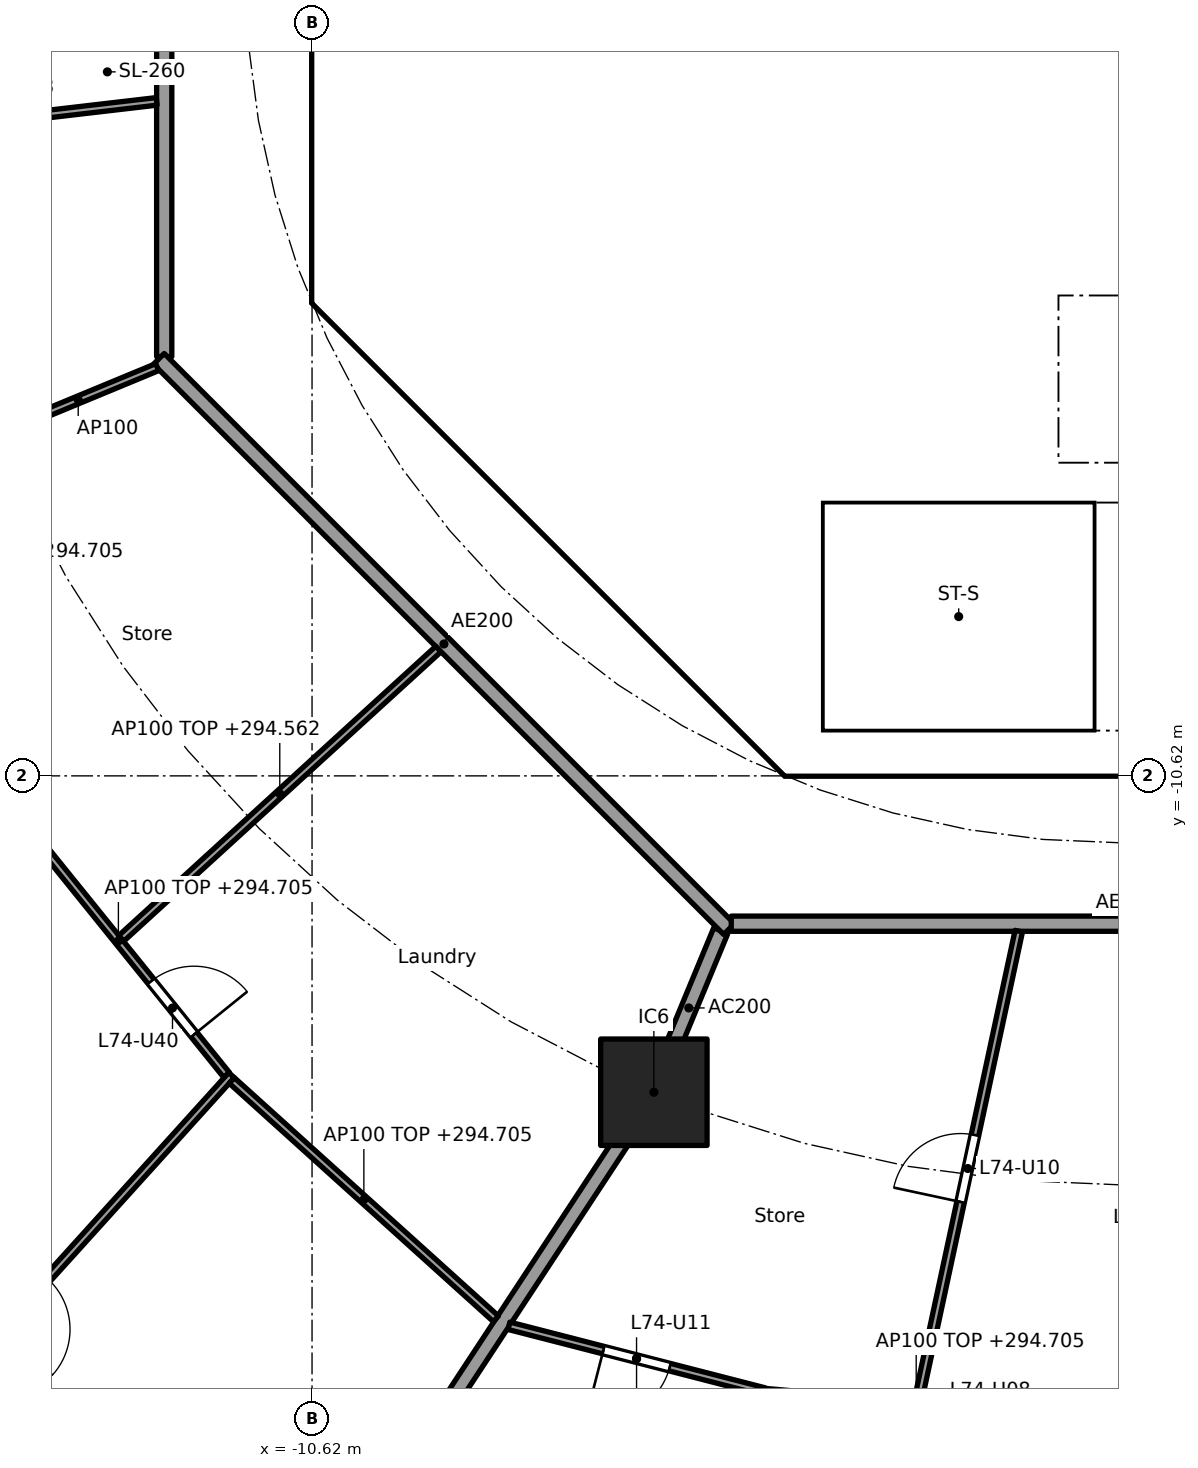
"""IFC4 building model, lengths in metres.
Left out: names, types, materials, properties, quantities, classifications, styles, units other than length and angle.
Written with IfcOpenShell. Run it as: python <this file> out.ifc"""

import sys

from ifc_helpers import new_model, si_unit, direction, frame, frame_2d, origin, origin_2d, place, context, subcontext, project, spatial, polyline, rectangle, outline, extrude, element, fill, save


model = new_model("IFC4")
c1 = context("Model", 3, precision=1e-05, world=origin(), true_north=direction((0.0, 1.0)))
c2 = subcontext(c1, "Body", "Model", "MODEL_VIEW")
j1 = project(units=[si_unit("LENGTHUNIT", "METRE"), si_unit("PLANEANGLEUNIT", "RADIAN")], contexts=[c1])
p1 = place(None, origin())
s1 = spatial("IfcSite", under=j1, at=p1, CompositionType="ELEMENT")
p2 = place(p1, origin())
s2 = spatial("IfcBuilding", under=s1, at=p2, CompositionType="ELEMENT")
p3 = place(p2, frame((0.0, 0.0, 291.8)))
s3 = spatial("IfcBuildingStorey", under=s2, at=p3, CompositionType="ELEMENT", Elevation=291.8)
p4 = place(p3, frame((-6.123, -14.782, 0.0), z_axis=(0.0, 0.0, 1.0), x_axis=(1.0, 0.0, 0.0)))
e1 = element("IfcColumn", 1, at=p4, inside=s3, PredefinedType="COLUMN", context=c2, shape_type="SweptSolid", body=[
    extrude(rectangle(XDim=1.4, YDim=1.4, at=origin_2d()), origin(), (0.0, 0.0, 1.0), 3.7),
])
p5 = place(p3, frame((-10.325, 3.801, 0.0), z_axis=(0.0, 0.0, 1.0), x_axis=(0.0, -1.0, 0.0)))
e2 = element("IfcWall", 2, at=p5, inside=s3, PredefinedType="SHEAR", context=c2, shape_type="SweptSolid", body=[
    extrude(rectangle(XDim=7.602, YDim=0.6, at=frame_2d((3.801, 0.0))), origin(), (0.0, 0.0, 1.0), 3.44),
])
p6 = place(p5, frame((0.651, 0.0, 0.0)))
e3 = element("IfcOpeningElement", 3, at=p6, cuts=e2, PredefinedType="OPENING", context=c2, shape_type="SweptSolid", body=[
    extrude(rectangle(XDim=1.5, YDim=2.1, at=frame_2d((0.75, 1.05))), frame((0.0, 0.31, 0.0), z_axis=(0.0, -1.0, 0.0), x_axis=(1.0, 0.0, 0.0)), (0.0, 0.0, 1.0), 0.62),
])
p7 = place(p5, frame((5.451, 0.0, 0.0)))
e4 = element("IfcOpeningElement", 4, at=p7, cuts=e2, PredefinedType="OPENING", context=c2, shape_type="SweptSolid", body=[
    extrude(rectangle(XDim=1.5, YDim=2.1, at=frame_2d((0.75, 1.05))), frame((0.0, 0.31, 0.0), z_axis=(0.0, -1.0, 0.0), x_axis=(1.0, 0.0, 0.0)), (0.0, 0.0, 1.0), 0.62),
])
p8 = place(p3, frame((-9.988, -4.613, 0.0), z_axis=(0.0, 0.0, 1.0), x_axis=(0.707106781187, -0.707106781187, 0.0)))
e5 = element("IfcWall", 5, at=p8, inside=s3, PredefinedType="SHEAR", context=c2, shape_type="SweptSolid", body=[
    extrude(rectangle(XDim=7.602, YDim=0.6, at=frame_2d((3.801, 0.0))), origin(), (0.0, 0.0, 1.0), 3.44),
])
p9 = place(p8, frame((6.151, 0.0, 0.0)))
e6 = element("IfcOpeningElement", 6, at=p9, cuts=e5, PredefinedType="OPENING", context=c2, shape_type="SweptSolid", body=[
    extrude(rectangle(XDim=1.1, YDim=2.1, at=frame_2d((0.55, 1.05))), frame((0.0, 0.31, 0.0), z_axis=(0.0, -1.0, 0.0), x_axis=(1.0, 0.0, 0.0)), (0.0, 0.0, 1.0), 0.62),
])
p10 = place(p3, frame((-5.8, -8.227, 0.0), z_axis=(0.0, 0.0, 1.0), x_axis=(0.0, 1.0, 0.0)))
e7 = element("IfcWall", 7, at=p10, inside=s3, PredefinedType="PARTITIONING", context=c2, shape_type="SweptSolid", body=[
    extrude(rectangle(XDim=3.927, YDim=0.15, at=frame_2d((1.963, 0.0))), origin(), (0.0, 0.0, 1.0), 3.44),
])
p11 = place(p10, frame((1.476, 0.0, 0.0)))
e8 = element("IfcOpeningElement", 8, at=p11, cuts=e7, PredefinedType="OPENING", context=c2, shape_type="SweptSolid", body=[
    extrude(rectangle(XDim=0.9, YDim=2.1, at=frame_2d((0.45, 1.05))), frame((0.0, 0.085, 0.0), z_axis=(0.0, -1.0, 0.0), x_axis=(1.0, 0.0, 0.0)), (0.0, 0.0, 1.0), 0.17),
])
p12 = place(p3, frame((-4.0, -6.5, 0.0), z_axis=(0.0, 0.0, 1.0), x_axis=(0.0, 1.0, 0.0)))
e9 = element("IfcWall", 9, at=p12, inside=s3, PredefinedType="SOLIDWALL", context=c2, shape_type="SweptSolid", body=[
    extrude(rectangle(XDim=2.2, YDim=0.2, at=frame_2d((1.1, 0.0))), origin(), (0.0, 0.0, 1.0), 3.44),
])
p13 = place(p12, frame((0.65, 0.0, 0.0)))
e10 = element("IfcOpeningElement", 10, at=p13, cuts=e9, PredefinedType="OPENING", context=c2, shape_type="SweptSolid", body=[
    extrude(rectangle(XDim=0.9, YDim=2.1, at=frame_2d((0.45, 1.05))), frame((0.0, 0.11, 0.0), z_axis=(0.0, -1.0, 0.0), x_axis=(1.0, 0.0, 0.0)), (0.0, 0.0, 1.0), 0.22),
])
p14 = place(p3, frame((-6.7, -2.0, 0.0), z_axis=(0.0, 0.0, 1.0), x_axis=(1.0, 0.0, 0.0)))
e11 = element("IfcWall", 11, at=p14, inside=s3, PredefinedType="SOLIDWALL", context=c2, shape_type="SweptSolid", body=[
    extrude(rectangle(XDim=13.4, YDim=0.2, at=frame_2d((6.7, 0.0))), origin(), (0.0, 0.0, 1.0), 3.44),
])
p15 = place(p14, frame((9.45, 0.0, 0.0)))
e12 = element("IfcOpeningElement", 12, at=p15, cuts=e11, PredefinedType="OPENING", context=c2, shape_type="SweptSolid", body=[
    extrude(rectangle(XDim=1.1, YDim=2.1, at=frame_2d((0.55, 1.05))), frame((0.0, 0.11, 0.0), z_axis=(0.0, -1.0, 0.0), x_axis=(1.0, 0.0, 0.0)), (0.0, 0.0, 1.0), 0.22),
])
p16 = place(p14, frame((11.65, 0.0, 0.0)))
e13 = element("IfcOpeningElement", 13, at=p16, cuts=e11, PredefinedType="OPENING", context=c2, shape_type="SweptSolid", body=[
    extrude(rectangle(XDim=1.1, YDim=2.1, at=frame_2d((0.55, 1.05))), frame((0.0, 0.11, 0.0), z_axis=(0.0, -1.0, 0.0), x_axis=(1.0, 0.0, 0.0)), (0.0, 0.0, 1.0), 0.22),
])
p17 = place(p14, frame((0.75, 0.0, 0.0)))
e14 = element("IfcOpeningElement", 14, at=p17, cuts=e11, PredefinedType="OPENING", context=c2, shape_type="SweptSolid", body=[
    extrude(rectangle(XDim=0.9, YDim=2.1, at=frame_2d((0.45, 1.05))), frame((0.0, 0.11, 0.0), z_axis=(0.0, -1.0, 0.0), x_axis=(1.0, 0.0, 0.0)), (0.0, 0.0, 1.0), 0.22),
])
p18 = place(p14, frame((2.95, 0.0, 0.0)))
e15 = element("IfcOpeningElement", 15, at=p18, cuts=e11, PredefinedType="OPENING", context=c2, shape_type="SweptSolid", body=[
    extrude(rectangle(XDim=0.9, YDim=2.1, at=frame_2d((0.45, 1.05))), frame((0.0, 0.11, 0.0), z_axis=(0.0, -1.0, 0.0), x_axis=(1.0, 0.0, 0.0)), (0.0, 0.0, 1.0), 0.22),
])
p19 = place(p14, frame((6.25, 0.0, 0.0)))
e16 = element("IfcOpeningElement", 16, at=p19, cuts=e11, PredefinedType="OPENING", context=c2, shape_type="SweptSolid", body=[
    extrude(rectangle(XDim=0.9, YDim=2.1, at=frame_2d((0.45, 1.05))), frame((0.0, 0.11, 0.0), z_axis=(0.0, -1.0, 0.0), x_axis=(1.0, 0.0, 0.0)), (0.0, 0.0, 1.0), 0.22),
])
p20 = place(p3, origin())
e17 = element("IfcWall", 17, at=p20, inside=s3, PredefinedType="SHEAR", context=c2, shape_type="SweptSolid", body=[
    extrude(outline(polyline([(-10.625, -3.801), (-10.025, -3.801), (-10.025, -4.152), (-9.776, -4.401), (-10.2, -4.825), (-10.625, -4.401), (-10.625, -3.801)])), origin(), (0.0, 0.0, 1.0), 3.44),
])
p21 = place(p3, origin())
e18 = element("IfcWall", 18, at=p21, inside=s3, PredefinedType="SHEAR", context=c2, shape_type="SweptSolid", body=[
    extrude(outline(polyline([(-4.152, -10.025), (4.152, -10.025), (4.401, -9.776), (4.825, -10.2), (4.401, -10.625), (-4.401, -10.625), (-4.825, -10.2), (-4.401, -9.776), (-4.152, -10.025)])), origin(), (0.0, 0.0, 1.0), 3.44),
])
p22 = place(p3, frame((-0.9, -6.5, 0.0), z_axis=(0.0, 0.0, 1.0), x_axis=(0.0, 1.0, 0.0)))
e19 = element("IfcWall", 19, at=p22, inside=s3, PredefinedType="SOLIDWALL", context=c2, shape_type="SweptSolid", body=[
    extrude(rectangle(XDim=2.2, YDim=0.2, at=frame_2d((1.1, 0.0))), origin(), (0.0, 0.0, 1.0), 3.44),
])
p23 = place(p3, origin())
e20 = element("IfcWall", 20, at=p23, inside=s3, PredefinedType="SOLIDWALL", context=c2, shape_type="SweptSolid", body=[
    extrude(outline(polyline([(-6.7, -2.1), (-6.5, -2.1), (-6.5, -4.1), (-4.5, -4.1), (-4.5, -2.1), (-4.3, -2.1), (-4.3, -4.1), (-2.3, -4.1), (-2.3, -2.1), (-2.1, -2.1), (-2.1, -4.1), (2.1, -4.1), (2.1, -2.1), (2.3, -2.1), (2.3, -4.1), (4.3, -4.1), (4.3, -2.1), (4.5, -2.1), (4.5, -4.1), (6.5, -4.1), (6.5, -2.1), (6.7, -2.1), (6.7, -4.3), (-6.7, -4.3), (-6.7, -2.1)])), origin(), (0.0, 0.0, 1.0), 3.44),
])
p24 = place(p3, frame((-10.025, -4.0, 0.0), z_axis=(0.0, 0.0, 1.0), x_axis=(1.0, 0.0, 0.0)))
e21 = element("IfcWall", 21, at=p24, inside=s3, PredefinedType="PARTITIONING", context=c2, shape_type="SweptSolid", body=[
    extrude(rectangle(XDim=3.325, YDim=0.2, at=frame_2d((1.662, 0.0))), origin(), (0.0, 0.0, 1.0), 3.44),
])
p25 = place(p3, origin())
e22 = element("IfcWall", 22, at=p25, inside=s3, PredefinedType="SOLIDWALL", context=c2, shape_type="SweptSolid", body=[
    extrude(outline(polyline([(-3.9, -10.025), (-4.1, -10.025), (-4.1, -7.025), (-3.9, -7.025), (-3.9, -10.025)])), origin(), (0.0, 0.0, 1.0), 3.44),
])
p26 = place(p3, origin())
e23 = element("IfcWall", 23, at=p26, inside=s3, PredefinedType="SOLIDWALL", context=c2, shape_type="SweptSolid", body=[
    extrude(outline(polyline([(4.1, -7.025), (-4.1, -7.025), (-4.1, -6.5), (4.1, -6.5), (4.1, -7.025)])), origin(), (0.0, 0.0, 1.0), 3.44),
])
p27 = place(p3, frame((-5.243, -12.657, 0.0), z_axis=(0.0, 0.0, 1.0), x_axis=(-0.382770106157, -0.923843626288, 0.0)))
e24 = element("IfcWall", 24, at=p27, inside=s3, PredefinedType="PARTITIONING", context=c2, shape_type="SweptSolid", body=[
    extrude(rectangle(XDim=2.199, YDim=0.2, at=frame_2d((1.1, 0.0))), origin(), (0.0, 0.0, 1.0), 3.44),
])
p28 = place(p3, frame((-6.151, -14.824, 0.0), z_axis=(0.0, 0.0, 1.0), x_axis=(-0.549345577828, -0.835595258556, 0.0)))
e25 = element("IfcWall", 25, at=p28, inside=s3, PredefinedType="PARTITIONING", context=c2, shape_type="SweptSolid", body=[
    extrude(rectangle(XDim=11.62, YDim=0.2, at=frame_2d((5.81, 0.0))), origin(), (0.0, 0.0, 1.0), 2.905),
])
p29 = place(p3, frame((-12.565, 5.304, 0.0), z_axis=(0.0, 0.0, 1.0), x_axis=(0.0, -1.0, 0.0)))
e26 = element("IfcWall", 26, at=p29, inside=s3, PredefinedType="PARTITIONING", context=c2, shape_type="SweptSolid", body=[
    extrude(rectangle(XDim=10.409, YDim=0.2, at=frame_2d((5.205, 0.0))), origin(), (0.0, 0.0, 1.0), 3.44),
])
p30 = place(p29, frame((4.804, 0.0, 0.0)))
e27 = element("IfcOpeningElement", 27, at=p30, cuts=e26, PredefinedType="OPENING", context=c2, shape_type="SweptSolid", body=[
    extrude(rectangle(XDim=1.0, YDim=2.1, at=frame_2d((0.5, 1.05))), frame((0.0, 0.11, 0.0), z_axis=(0.0, -1.0, 0.0), x_axis=(1.0, 0.0, 0.0)), (0.0, 0.0, 1.0), 0.22),
])
p31 = place(p3, frame((-12.635, -5.134, 0.0), z_axis=(0.0, 0.0, 1.0), x_axis=(0.707106781187, -0.707106781187, 0.0)))
e28 = element("IfcWall", 28, at=p31, inside=s3, PredefinedType="PARTITIONING", context=c2, shape_type="SweptSolid", body=[
    extrude(rectangle(XDim=10.609, YDim=0.2, at=frame_2d((5.305, 0.0))), origin(), (0.0, 0.0, 1.0), 3.44),
])
p32 = place(p3, frame((-5.104, -12.565, 0.0), z_axis=(0.0, 0.0, 1.0), x_axis=(1.0, 0.0, 0.0)))
e29 = element("IfcWall", 29, at=p32, inside=s3, PredefinedType="PARTITIONING", context=c2, shape_type="SweptSolid", body=[
    extrude(rectangle(XDim=10.409, YDim=0.2, at=frame_2d((5.205, 0.0))), origin(), (0.0, 0.0, 1.0), 3.44),
])
p33 = place(p3, frame((-12.664, -1.746, 0.0), z_axis=(0.0, 0.0, 1.0), x_axis=(-0.993265121683, -0.115863704621, 0.0)))
e30 = element("IfcWall", 30, at=p33, inside=s3, PredefinedType="PARTITIONING", context=c2, shape_type="SweptSolid", body=[
    extrude(rectangle(XDim=4.724, YDim=0.1, at=frame_2d((2.362, 0.0))), origin(), (0.0, 0.0, 1.0), 2.762),
])
p34 = place(p33, frame((1.887, 0.0, 0.0)))
e31 = element("IfcOpeningElement", 31, at=p34, cuts=e30, PredefinedType="OPENING", context=c2, shape_type="SweptSolid", body=[
    extrude(rectangle(XDim=0.9, YDim=2.1, at=frame_2d((0.45, 1.05))), frame((0.0, 0.06, 0.0), z_axis=(0.0, -1.0, 0.0), x_axis=(1.0, 0.0, 0.0)), (0.0, 0.0, 1.0), 0.12),
])
p35 = place(p3, frame((-12.657, -5.243, 0.0), z_axis=(0.0, 0.0, 1.0), x_axis=(-0.923871314276, -0.382703272338, 0.0)))
e32 = element("IfcWall", 32, at=p35, inside=s3, PredefinedType="PARTITIONING", context=c2, shape_type="SweptSolid", body=[
    extrude(rectangle(XDim=2.249, YDim=0.1, at=frame_2d((1.125, 0.0))), origin(), (0.0, 0.0, 1.0), 3.44),
])
p36 = place(p3, frame((-14.591, -11.029, 0.0), z_axis=(0.0, 0.0, 1.0), x_axis=(0.628170338674, -0.778075848237, 0.0)))
e33 = element("IfcWall", 33, at=p36, inside=s3, PredefinedType="PARTITIONING", context=c2, shape_type="SweptSolid", body=[
    extrude(rectangle(XDim=4.532, YDim=0.1, at=frame_2d((2.266, 0.0))), origin(), (0.0, 0.0, 1.0), 2.905),
])
p37 = place(p36, frame((2.949, 0.0, 0.0)))
e34 = element("IfcOpeningElement", 34, at=p37, cuts=e33, PredefinedType="OPENING", context=c2, shape_type="SweptSolid", body=[
    extrude(rectangle(XDim=0.9, YDim=2.1, at=frame_2d((0.45, 1.05))), frame((0.0, 0.06, 0.0), z_axis=(0.0, -1.0, 0.0), x_axis=(1.0, 0.0, 0.0)), (0.0, 0.0, 1.0), 0.12),
])
p38 = place(p3, frame((-8.958, -8.952, 0.0), z_axis=(0.0, 0.0, 1.0), x_axis=(-0.73876526954, -0.673962815385, 0.0)))
e35 = element("IfcWall", 35, at=p38, inside=s3, PredefinedType="PARTITIONING", context=c2, shape_type="SweptSolid", body=[
    extrude(rectangle(XDim=5.647, YDim=0.1, at=frame_2d((2.824, 0.0))), origin(), (0.0, 0.0, 1.0), 2.762),
])
p39 = place(p3, frame((-11.679, -14.557, 0.0), z_axis=(0.0, 0.0, 1.0), x_axis=(-0.670800011545, -0.741638284146, 0.0)))
e36 = element("IfcWall", 36, at=p39, inside=s3, PredefinedType="PARTITIONING", context=c2, shape_type="SweptSolid", body=[
    extrude(rectangle(XDim=8.068, YDim=0.1, at=frame_2d((4.034, 0.0))), origin(), (0.0, 0.0, 1.0), 2.905),
])
p40 = place(p39, frame((3.609, 0.0, 0.0)))
e37 = element("IfcOpeningElement", 37, at=p40, cuts=e36, PredefinedType="OPENING", context=c2, shape_type="SweptSolid", body=[
    extrude(rectangle(XDim=0.9, YDim=2.1, at=frame_2d((0.45, 1.05))), frame((0.0, 0.06, 0.0), z_axis=(0.0, -1.0, 0.0), x_axis=(1.0, 0.0, 0.0)), (0.0, 0.0, 1.0), 0.12),
])
p41 = place(p3, frame((-11.676, -14.628, 0.0), z_axis=(0.0, 0.0, 1.0), x_axis=(0.74245829867, -0.669892285921, 0.0)))
e38 = element("IfcWall", 38, at=p41, inside=s3, PredefinedType="PARTITIONING", context=c2, shape_type="SweptSolid", body=[
    extrude(rectangle(XDim=4.68, YDim=0.1, at=frame_2d((2.34, 0.0))), origin(), (0.0, 0.0, 1.0), 2.905),
])
p42 = place(p3, frame((-8.03, -17.854, 0.0), z_axis=(0.0, 0.0, 1.0), x_axis=(0.968441967324, -0.249239154077, 0.0)))
e39 = element("IfcWall", 39, at=p42, inside=s3, PredefinedType="PARTITIONING", context=c2, shape_type="SweptSolid", body=[
    extrude(rectangle(XDim=3.468, YDim=0.1, at=frame_2d((1.734, 0.0))), origin(), (0.0, 0.0, 1.0), 2.905),
])
p43 = place(p42, frame((1.284, 0.0, 0.0)))
e40 = element("IfcOpeningElement", 40, at=p43, cuts=e39, PredefinedType="OPENING", context=c2, shape_type="SweptSolid", body=[
    extrude(rectangle(XDim=0.9, YDim=2.1, at=frame_2d((0.45, 1.05))), frame((0.0, 0.06, 0.0), z_axis=(0.0, -1.0, 0.0), x_axis=(1.0, 0.0, 0.0)), (0.0, 0.0, 1.0), 0.12),
])
p44 = place(p3, frame((-4.673, -18.727, 0.0), z_axis=(0.0, 0.0, 1.0), x_axis=(0.995982840882, -0.089544294447, 0.0)))
e41 = element("IfcWall", 41, at=p44, inside=s3, PredefinedType="PARTITIONING", context=c2, shape_type="SweptSolid", body=[
    extrude(rectangle(XDim=4.019, YDim=0.1, at=frame_2d((2.009, 0.0))), origin(), (0.0, 0.0, 1.0), 2.905),
])
p45 = place(p44, frame((2.539, 0.0, 0.0)))
e42 = element("IfcOpeningElement", 42, at=p45, cuts=e41, PredefinedType="OPENING", context=c2, shape_type="SweptSolid", body=[
    extrude(rectangle(XDim=0.9, YDim=2.1, at=frame_2d((0.45, 1.05))), frame((0.0, 0.06, 0.0), z_axis=(0.0, -1.0, 0.0), x_axis=(1.0, 0.0, 0.0)), (0.0, 0.0, 1.0), 0.12),
])
p46 = place(p3, frame((-1.322, -12.663, 0.0), z_axis=(0.0, 0.0, 1.0), x_axis=(-0.209957681159, -0.97771047459, 0.0)))
e43 = element("IfcWall", 43, at=p46, inside=s3, PredefinedType="PARTITIONING", context=c2, shape_type="SweptSolid", body=[
    extrude(rectangle(XDim=16.299, YDim=0.1, at=frame_2d((8.149, 0.0))), origin(), (0.0, 0.0, 1.0), 2.762),
])
p47 = place(p46, frame((2.744, 0.0, 0.0)))
e44 = element("IfcOpeningElement", 44, at=p47, cuts=e43, PredefinedType="OPENING", context=c2, shape_type="SweptSolid", body=[
    extrude(rectangle(XDim=0.9, YDim=2.1, at=frame_2d((0.45, 1.05))), frame((0.0, 0.06, 0.0), z_axis=(0.0, -1.0, 0.0), x_axis=(1.0, 0.0, 0.0)), (0.0, 0.0, 1.0), 0.12),
])
p48 = place(p11, origin())
e45 = element("IfcDoor", 45, at=p48, inside=s3, OperationType="SINGLE_SWING_RIGHT", PredefinedType="DOOR", context=c2, shape_type="SweptSolid", body=[
    extrude(rectangle(XDim=0.9, YDim=2.1, at=frame_2d((0.45, 1.05))), frame((0.0, 0.025, 0.0), z_axis=(0.0, -1.0, 0.0), x_axis=(1.0, 0.0, 0.0)), (0.0, 0.0, 1.0), 0.05),
])
fill(e8, e45)
p49 = place(p13, frame((0.9, 0.0, 0.0), x_axis=(-1.0, 0.0, 0.0)))
e46 = element("IfcDoor", 46, at=p49, inside=s3, OperationType="SINGLE_SWING_LEFT", PredefinedType="DOOR", context=c2, shape_type="SweptSolid", body=[
    extrude(rectangle(XDim=0.9, YDim=2.1, at=frame_2d((0.45, 1.05))), frame((0.0, 0.025, 0.0), z_axis=(0.0, -1.0, 0.0), x_axis=(1.0, 0.0, 0.0)), (0.0, 0.0, 1.0), 0.05),
])
fill(e10, e46)
p50 = place(p17, frame((0.9, 0.0, 0.0), x_axis=(-1.0, 0.0, 0.0)))
e47 = element("IfcDoor", 47, at=p50, inside=s3, OperationType="SINGLE_SWING_RIGHT", PredefinedType="DOOR", context=c2, shape_type="SweptSolid", body=[
    extrude(rectangle(XDim=0.9, YDim=2.1, at=frame_2d((0.45, 1.05))), frame((0.0, 0.025, 0.0), z_axis=(0.0, -1.0, 0.0), x_axis=(1.0, 0.0, 0.0)), (0.0, 0.0, 1.0), 0.05),
])
fill(e14, e47)
p51 = place(p18, frame((0.9, 0.0, 0.0), x_axis=(-1.0, 0.0, 0.0)))
e48 = element("IfcDoor", 48, at=p51, inside=s3, OperationType="SINGLE_SWING_RIGHT", PredefinedType="DOOR", context=c2, shape_type="SweptSolid", body=[
    extrude(rectangle(XDim=0.9, YDim=2.1, at=frame_2d((0.45, 1.05))), frame((0.0, 0.025, 0.0), z_axis=(0.0, -1.0, 0.0), x_axis=(1.0, 0.0, 0.0)), (0.0, 0.0, 1.0), 0.05),
])
fill(e15, e48)
p52 = place(p19, frame((0.9, 0.0, 0.0), x_axis=(-1.0, 0.0, 0.0)))
e49 = element("IfcDoor", 49, at=p52, inside=s3, OperationType="SINGLE_SWING_RIGHT", PredefinedType="DOOR", context=c2, shape_type="SweptSolid", body=[
    extrude(rectangle(XDim=0.9, YDim=2.1, at=frame_2d((0.45, 1.05))), frame((0.0, 0.025, 0.0), z_axis=(0.0, -1.0, 0.0), x_axis=(1.0, 0.0, 0.0)), (0.0, 0.0, 1.0), 0.05),
])
fill(e16, e49)
p53 = place(p7, origin())
e50 = element("IfcDoor", 50, at=p53, inside=s3, OperationType="DOUBLE_DOOR_SINGLE_SWING", PredefinedType="DOOR", context=c2, shape_type="SweptSolid", body=[
    extrude(rectangle(XDim=1.5, YDim=2.1, at=frame_2d((0.75, 1.05))), frame((0.0, 0.025, 0.0), z_axis=(0.0, -1.0, 0.0), x_axis=(1.0, 0.0, 0.0)), (0.0, 0.0, 1.0), 0.05),
])
fill(e4, e50)
p54 = place(p9, origin())
e51 = element("IfcDoor", 51, at=p54, inside=s3, OperationType="SINGLE_SWING_RIGHT", PredefinedType="DOOR", context=c2, shape_type="SweptSolid", body=[
    extrude(rectangle(XDim=1.1, YDim=2.1, at=frame_2d((0.55, 1.05))), frame((0.0, 0.025, 0.0), z_axis=(0.0, -1.0, 0.0), x_axis=(1.0, 0.0, 0.0)), (0.0, 0.0, 1.0), 0.05),
])
fill(e6, e51)
p55 = place(p47, frame((0.9, 0.0, 0.0), x_axis=(-1.0, 0.0, 0.0)))
e52 = element("IfcDoor", 52, at=p55, inside=s3, OperationType="SINGLE_SWING_LEFT", PredefinedType="DOOR", context=c2, shape_type="SweptSolid", body=[
    extrude(rectangle(XDim=0.9, YDim=2.1, at=frame_2d((0.45, 1.05))), frame((0.0, 0.025, 0.0), z_axis=(0.0, -1.0, 0.0), x_axis=(1.0, 0.0, 0.0)), (0.0, 0.0, 1.0), 0.05),
])
fill(e44, e52)
p56 = place(p43, frame((0.9, 0.0, 0.0), x_axis=(-1.0, 0.0, 0.0)))
e53 = element("IfcDoor", 53, at=p56, inside=s3, OperationType="SINGLE_SWING_RIGHT", PredefinedType="DOOR", context=c2, shape_type="SweptSolid", body=[
    extrude(rectangle(XDim=0.9, YDim=2.1, at=frame_2d((0.45, 1.05))), frame((0.0, 0.025, 0.0), z_axis=(0.0, -1.0, 0.0), x_axis=(1.0, 0.0, 0.0)), (0.0, 0.0, 1.0), 0.05),
])
fill(e40, e53)
p57 = place(p37, origin())
e54 = element("IfcDoor", 54, at=p57, inside=s3, OperationType="SINGLE_SWING_RIGHT", PredefinedType="DOOR", context=c2, shape_type="SweptSolid", body=[
    extrude(rectangle(XDim=0.9, YDim=2.1, at=frame_2d((0.45, 1.05))), frame((0.0, 0.025, 0.0), z_axis=(0.0, -1.0, 0.0), x_axis=(1.0, 0.0, 0.0)), (0.0, 0.0, 1.0), 0.05),
])
fill(e34, e54)
save(model, sys.argv[1])
